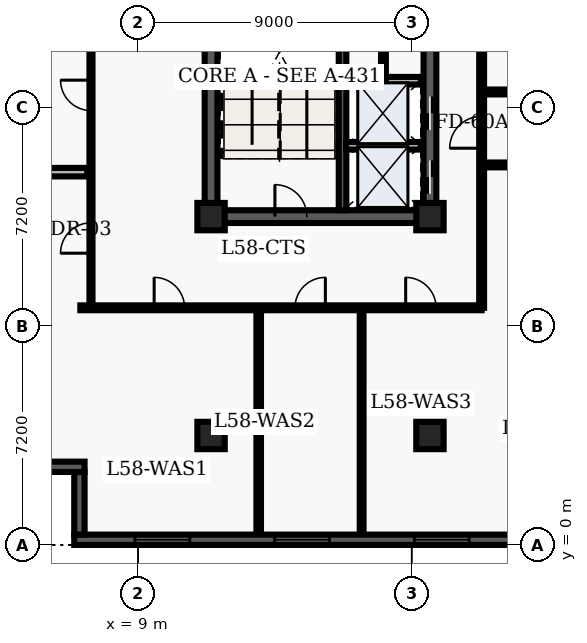
"""IFC4 building model, lengths in metres.
Left out: names, types, materials, properties, quantities, classifications, styles, units other than length and angle.
Written with IfcOpenShell. Run it as: python <this file> out.ifc"""

import sys

from ifc_helpers import new_model, entity, si_unit, converted_unit, direction, frame, origin_with_axes, origin_2d_with_axis, place, context, subcontext, project, spatial, polyline, rectangle, outline, extrude, element, fill, save


model = new_model("IFC4")
c1 = context("Model", 3, precision=1e-05, world=origin_with_axes(), true_north=direction((0.0, 1.0)))
c2 = subcontext(c1, "Body", "Model", "MODEL_VIEW")
j1 = project(units=[si_unit("LENGTHUNIT", "METRE"), converted_unit("PLANEANGLEUNIT", "DEGREE", entity("IfcPlaneAngleMeasure", 0.017), si_unit("PLANEANGLEUNIT", "RADIAN"), dimensions=[0, 0, 0, 0, 0, 0, 0])], contexts=[c1])
p1 = place(None, origin_with_axes())
s1 = spatial("IfcSite", under=j1, at=p1, CompositionType="ELEMENT")
p2 = place(p1, origin_with_axes())
s2 = spatial("IfcBuilding", under=s1, at=p2, CompositionType="ELEMENT")
p3 = place(p2, frame((0.0, 0.0, 236.4), z_axis=(0.0, 0.0, 1.0), x_axis=(1.0, 0.0, 0.0)))
s3 = spatial("IfcBuildingStorey", under=s2, at=p3, CompositionType="ELEMENT", Elevation=236.4)
p4 = place(p3, frame((11.4, 10.8, 0.0), z_axis=(0.0, 0.0, 1.0), x_axis=(0.0, 1.0, 0.0)))
e1 = element("IfcWall", 1, at=p4, inside=s3, PredefinedType="SHEAR", context=c2, shape_type="SweptSolid", body=[
    extrude(outline(polyline([(0.0, -0.21), (27.0, -0.21), (27.0, 0.21), (0.0, 0.21), (0.0, -0.21)])), origin_with_axes(), (0.0, 0.0, 1.0), 3.66),
])
p5 = place(p3, frame((11.4, 10.8, 0.0), z_axis=(0.0, 0.0, 1.0), x_axis=(1.0, 0.0, 0.0)))
e2 = element("IfcWall", 2, at=p5, inside=s3, PredefinedType="SHEAR", context=c2, shape_type="SweptSolid", body=[
    extrude(outline(polyline([(0.0, -0.21), (7.2, -0.21), (7.2, 0.21), (0.0, 0.21), (0.0, -0.21)])), origin_with_axes(), (0.0, 0.0, 1.0), 3.66),
])
p6 = place(p5, frame((2.625, 0.0, 0.0), z_axis=(0.0, 0.0, 1.0), x_axis=(1.0, 0.0, 0.0)))
e3 = element("IfcOpeningElement", 3, at=p6, cuts=e2, PredefinedType="OPENING", context=c2, shape_type="SweptSolid", body=[
    extrude(rectangle(XDim=1.05, YDim=0.44, at=origin_2d_with_axis()), origin_with_axes(), (0.0, 0.0, 1.0), 2.15),
])
p7 = place(p3, frame((18.6, 10.8, 0.0), z_axis=(0.0, 0.0, 1.0), x_axis=(0.0, 1.0, 0.0)))
e4 = element("IfcWall", 4, at=p7, inside=s3, PredefinedType="SHEAR", context=c2, shape_type="SweptSolid", body=[
    extrude(outline(polyline([(0.0, -0.21), (13.5, -0.21), (13.5, 0.21), (0.0, 0.21), (0.0, -0.21)])), origin_with_axes(), (0.0, 0.0, 1.0), 3.66),
])
p8 = place(p7, frame((1.3, 0.0, 0.0), z_axis=(0.0, 0.0, 1.0), x_axis=(1.0, 0.0, 0.0)))
e5 = element("IfcOpeningElement", 5, at=p8, cuts=e4, PredefinedType="OPENING", context=c2, shape_type="SweptSolid", body=[
    extrude(rectangle(XDim=1.1, YDim=0.44, at=origin_2d_with_axis()), origin_with_axes(), (0.0, 0.0, 1.0), 2.15),
])
p9 = place(p7, frame((3.4, 0.0, 0.0), z_axis=(0.0, 0.0, 1.0), x_axis=(1.0, 0.0, 0.0)))
e6 = element("IfcOpeningElement", 6, at=p9, cuts=e4, PredefinedType="OPENING", context=c2, shape_type="SweptSolid", body=[
    extrude(rectangle(XDim=1.1, YDim=0.44, at=origin_2d_with_axis()), origin_with_axes(), (0.0, 0.0, 1.0), 2.15),
])
p10 = place(p7, frame((11.125, 0.0, 0.0), z_axis=(0.0, 0.0, 1.0), x_axis=(1.0, 0.0, 0.0)))
e7 = element("IfcOpeningElement", 7, at=p10, cuts=e4, PredefinedType="OPENING", context=c2, shape_type="SweptSolid", body=[
    extrude(rectangle(XDim=1.05, YDim=0.44, at=origin_2d_with_axis()), origin_with_axes(), (0.0, 0.0, 1.0), 2.15),
])
p11 = place(p7, frame((6.675, 0.0, 0.0), z_axis=(0.0, 0.0, 1.0), x_axis=(1.0, 0.0, 0.0)))
e8 = element("IfcOpeningElement", 8, at=p11, cuts=e4, PredefinedType="OPENING", context=c2, shape_type="SweptSolid", body=[
    extrude(rectangle(XDim=0.95, YDim=0.44, at=origin_2d_with_axis()), origin_with_axes(), (0.0, 0.0, 1.0), 2.15),
])
p12 = place(p3, frame((15.725, 11.01, 0.0), z_axis=(0.0, 0.0, 1.0), x_axis=(0.0, 1.0, 0.0)))
e9 = element("IfcWall", 9, at=p12, inside=s3, PredefinedType="SHEAR", context=c2, shape_type="SweptSolid", body=[
    extrude(outline(polyline([(0.0, -0.125), (8.69, -0.125), (8.69, 0.125), (0.0, 0.125), (0.0, -0.125)])), origin_with_axes(), (0.0, 0.0, 1.0), 3.66),
])
for number, where, z_axis, x_axis in (
    (10, (11.4, 3.6, 0.0), (0.0, 0.0, 1.0), (1.0, 0.0, 0.0)),
    (11, (11.4, 10.8, 0.0), (0.0, 0.0, 1.0), (1.0, 0.0, 0.0)),
    (12, (18.6, 3.6, 0.0), (0.0, 0.0, 1.0), (1.0, 0.0, 0.0)),
    (13, (18.6, 10.8, 0.0), (0.0, 0.0, 1.0), (1.0, 0.0, 0.0)),
):
    element("IfcColumn", number, at=place(p3, frame(where, z_axis=z_axis, x_axis=x_axis)), inside=s3, PredefinedType="COLUMN", context=c2, shape_type="SweptSolid", body=[
        extrude(rectangle(XDim=0.9, YDim=0.9, at=origin_2d_with_axis()), origin_with_axes(), (0.0, 0.0, 1.0), 3.9),
    ])
for number, where, z_axis, x_axis in (
    (14, (15.84, 13.13, 0.0), (0.0, 0.0, 1.0), (1.0, 0.0, 0.0)),
    (15, (15.84, 15.27, 0.0), (0.0, 0.0, 1.0), (1.0, 0.0, 0.0)),
):
    element("IfcWall", number, at=place(p3, frame(where, z_axis=z_axis, x_axis=x_axis)), inside=s3, PredefinedType="SOLIDWALL", context=c2, shape_type="SweptSolid", body=[
        extrude(outline(polyline([(0.0, -0.125), (2.46, -0.125), (2.46, 0.125), (0.0, 0.125), (0.0, -0.125)])), origin_with_axes(), (0.0, 0.0, 1.0), 2.7),
    ])
p13 = place(p3, frame((17.07, 15.34, 0.0), z_axis=(0.0, 0.0, 1.0), x_axis=(0.0, 1.0, 0.0)))
e16 = element("IfcWall", 16, at=p13, inside=s3, PredefinedType="PARTITIONING", context=c2, shape_type="SweptSolid", body=[
    extrude(outline(polyline([(0.0, -0.08), (4.36, -0.08), (4.36, 0.08), (0.0, 0.08), (0.0, -0.08)])), origin_with_axes(), (0.0, 0.0, 1.0), 2.7),
])
p14 = place(p13, frame((2.05, 0.0, 0.0), z_axis=(0.0, 0.0, 1.0), x_axis=(1.0, 0.0, 0.0)))
e17 = element("IfcOpeningElement", 17, at=p14, cuts=e16, PredefinedType="OPENING", context=c2, shape_type="SweptSolid", body=[
    extrude(rectangle(XDim=0.9, YDim=0.18, at=origin_2d_with_axis()), origin_with_axes(), (0.0, 0.0, 1.0), 2.15),
])
p15 = place(p3, frame((7.1, 7.8, 0.0), z_axis=(0.0, 0.0, 1.0), x_axis=(1.0, 0.0, 0.0)))
e18 = element("IfcWall", 18, at=p15, inside=s3, PredefinedType="PARTITIONING", context=c2, shape_type="SweptSolid", body=[
    extrude(outline(polyline([(0.0, -0.08), (13.2, -0.08), (13.2, 0.08), (0.0, 0.08), (0.0, -0.08)])), origin_with_axes(), (0.0, 0.0, 1.0), 2.7),
])
p16 = place(p15, frame((2.929, 0.0, 0.0), z_axis=(0.0, 0.0, 1.0), x_axis=(1.0, 0.0, 0.0)))
e19 = element("IfcOpeningElement", 19, at=p16, cuts=e18, PredefinedType="OPENING", context=c2, shape_type="SweptSolid", body=[
    extrude(rectangle(XDim=1.0, YDim=0.18, at=origin_2d_with_axis()), origin_with_axes(), (0.0, 0.0, 1.0), 2.15),
])
p17 = place(p15, frame((7.56, 0.0, 0.0), z_axis=(0.0, 0.0, 1.0), x_axis=(1.0, 0.0, 0.0)))
e20 = element("IfcOpeningElement", 20, at=p17, cuts=e18, PredefinedType="OPENING", context=c2, shape_type="SweptSolid", body=[
    extrude(rectangle(XDim=1.0, YDim=0.18, at=origin_2d_with_axis()), origin_with_axes(), (0.0, 0.0, 1.0), 2.15),
])
p18 = place(p15, frame((11.201, 0.0, 0.0), z_axis=(0.0, 0.0, 1.0), x_axis=(1.0, 0.0, 0.0)))
e21 = element("IfcOpeningElement", 21, at=p18, cuts=e18, PredefinedType="OPENING", context=c2, shape_type="SweptSolid", body=[
    extrude(rectangle(XDim=1.0, YDim=0.18, at=origin_2d_with_axis()), origin_with_axes(), (0.0, 0.0, 1.0), 2.15),
])
p19 = place(p3, frame((20.3, 7.8, 0.0), z_axis=(0.0, 0.0, 1.0), x_axis=(0.0, 1.0, 0.0)))
e22 = element("IfcWall", 22, at=p19, inside=s3, PredefinedType="PARTITIONING", context=c2, shape_type="SweptSolid", body=[
    extrude(outline(polyline([(0.0, -0.08), (32.7, -0.08), (32.7, 0.08), (0.0, 0.08), (0.0, -0.08)])), origin_with_axes(), (0.0, 0.0, 1.0), 2.7),
])
p20 = place(p19, frame((14.556, 0.0, 0.0), z_axis=(0.0, 0.0, 1.0), x_axis=(1.0, 0.0, 0.0)))
e23 = element("IfcOpeningElement", 23, at=p20, cuts=e22, PredefinedType="OPENING", context=c2, shape_type="SweptSolid", body=[
    extrude(rectangle(XDim=0.9, YDim=0.18, at=origin_2d_with_axis()), origin_with_axes(), (0.0, 0.0, 1.0), 2.15),
])
p21 = place(p19, frame((18.551, 0.0, 0.0), z_axis=(0.0, 0.0, 1.0), x_axis=(1.0, 0.0, 0.0)))
e24 = element("IfcOpeningElement", 24, at=p21, cuts=e22, PredefinedType="OPENING", context=c2, shape_type="SweptSolid", body=[
    extrude(rectangle(XDim=1.0, YDim=0.18, at=origin_2d_with_axis()), origin_with_axes(), (0.0, 0.0, 1.0), 2.15),
])
p22 = place(p19, frame((22.226, 0.0, 0.0), z_axis=(0.0, 0.0, 1.0), x_axis=(1.0, 0.0, 0.0)))
e25 = element("IfcOpeningElement", 25, at=p22, cuts=e22, PredefinedType="OPENING", context=c2, shape_type="SweptSolid", body=[
    extrude(rectangle(XDim=1.0, YDim=0.18, at=origin_2d_with_axis()), origin_with_axes(), (0.0, 0.0, 1.0), 2.15),
])
p23 = place(p19, frame((25.754, 0.0, 0.0), z_axis=(0.0, 0.0, 1.0), x_axis=(1.0, 0.0, 0.0)))
e26 = element("IfcOpeningElement", 26, at=p23, cuts=e22, PredefinedType="OPENING", context=c2, shape_type="SweptSolid", body=[
    extrude(rectangle(XDim=1.0, YDim=0.18, at=origin_2d_with_axis()), origin_with_axes(), (0.0, 0.0, 1.0), 2.15),
])
p24 = place(p19, frame((5.775, 0.0, 0.0), z_axis=(0.0, 0.0, 1.0), x_axis=(1.0, 0.0, 0.0)))
e27 = element("IfcOpeningElement", 27, at=p24, cuts=e22, PredefinedType="OPENING", context=c2, shape_type="SweptSolid", body=[
    extrude(rectangle(XDim=1.05, YDim=0.18, at=origin_2d_with_axis()), origin_with_axes(), (0.0, 0.0, 1.0), 2.15),
])
p25 = place(p3, frame((7.45, 7.8, 0.0), z_axis=(0.0, 0.0, 1.0), x_axis=(0.0, 1.0, 0.0)))
e28 = element("IfcWall", 28, at=p25, inside=s3, PredefinedType="PARTITIONING", context=c2, shape_type="SweptSolid", body=[
    extrude(outline(polyline([(0.0, -0.05), (32.7, -0.05), (32.7, 0.05), (0.0, 0.05), (0.0, -0.05)])), origin_with_axes(), (0.0, 0.0, 1.0), 2.7),
])
p26 = place(p25, frame((2.296, 0.0, 0.0), z_axis=(0.0, 0.0, 1.0), x_axis=(1.0, 0.0, 0.0)))
e29 = element("IfcOpeningElement", 29, at=p26, cuts=e28, PredefinedType="OPENING", context=c2, shape_type="SweptSolid", body=[
    extrude(rectangle(XDim=1.0, YDim=0.12, at=origin_2d_with_axis()), origin_with_axes(), (0.0, 0.0, 1.0), 2.15),
])
p27 = place(p25, frame((6.989, 0.0, 0.0), z_axis=(0.0, 0.0, 1.0), x_axis=(1.0, 0.0, 0.0)))
e30 = element("IfcOpeningElement", 30, at=p27, cuts=e28, PredefinedType="OPENING", context=c2, shape_type="SweptSolid", body=[
    extrude(rectangle(XDim=1.0, YDim=0.12, at=origin_2d_with_axis()), origin_with_axes(), (0.0, 0.0, 1.0), 2.15),
])
p28 = place(p25, frame((12.56, 0.0, 0.0), z_axis=(0.0, 0.0, 1.0), x_axis=(1.0, 0.0, 0.0)))
e31 = element("IfcOpeningElement", 31, at=p28, cuts=e28, PredefinedType="OPENING", context=c2, shape_type="SweptSolid", body=[
    extrude(rectangle(XDim=1.0, YDim=0.12, at=origin_2d_with_axis()), origin_with_axes(), (0.0, 0.0, 1.0), 2.15),
])
p29 = place(p25, frame((19.334, 0.0, 0.0), z_axis=(0.0, 0.0, 1.0), x_axis=(1.0, 0.0, 0.0)))
e32 = element("IfcOpeningElement", 32, at=p29, cuts=e28, PredefinedType="OPENING", context=c2, shape_type="SweptSolid", body=[
    extrude(rectangle(XDim=1.0, YDim=0.12, at=origin_2d_with_axis()), origin_with_axes(), (0.0, 0.0, 1.0), 2.15),
])
p30 = place(p25, frame((27.817, 0.0, 0.0), z_axis=(0.0, 0.0, 1.0), x_axis=(1.0, 0.0, 0.0)))
e33 = element("IfcOpeningElement", 33, at=p30, cuts=e28, PredefinedType="OPENING", context=c2, shape_type="SweptSolid", body=[
    extrude(rectangle(XDim=1.0, YDim=0.12, at=origin_2d_with_axis()), origin_with_axes(), (0.0, 0.0, 1.0), 2.15),
])
p31 = place(p3, frame((4.835, 12.262, 0.0), z_axis=(0.0, 0.0, 1.0), x_axis=(1.0, 0.0, 0.0)))
e34 = element("IfcWall", 34, at=p31, inside=s3, PredefinedType="PARTITIONING", context=c2, shape_type="SweptSolid", body=[
    extrude(outline(polyline([(0.0, -0.14), (2.495, -0.14), (2.495, 0.14), (0.0, 0.14), (0.0, -0.14)])), origin_with_axes(), (0.0, 0.0, 1.0), 2.7),
])
p32 = place(p3, frame((12.967, 0.335, 0.0), z_axis=(0.0, 0.0, 1.0), x_axis=(0.0, 1.0, 0.0)))
e35 = element("IfcWall", 35, at=p32, inside=s3, PredefinedType="PARTITIONING", context=c2, shape_type="SweptSolid", body=[
    extrude(outline(polyline([(0.0, -0.075), (7.365, -0.075), (7.365, 0.075), (0.0, 0.075), (0.0, -0.075)])), origin_with_axes(), (0.0, 0.0, 1.0), 2.7),
])
p33 = place(p3, frame((16.353, 0.335, 0.0), z_axis=(0.0, 0.0, 1.0), x_axis=(0.0, 1.0, 0.0)))
e36 = element("IfcWall", 36, at=p33, inside=s3, PredefinedType="PARTITIONING", context=c2, shape_type="SweptSolid", body=[
    extrude(outline(polyline([(0.0, -0.062), (7.365, -0.062), (7.365, 0.062), (0.0, 0.062), (0.0, -0.062)])), origin_with_axes(), (0.0, 0.0, 1.0), 2.7),
])
p34 = place(p3, frame((20.3, 12.5, 0.0), z_axis=(0.0, 0.0, 1.0), x_axis=(1.0, 0.0, 0.0)))
e37 = element("IfcWall", 37, at=p34, inside=s3, PredefinedType="PARTITIONING", context=c2, shape_type="SweptSolid", body=[
    extrude(outline(polyline([(0.0, -0.08), (16.05, -0.08), (16.05, 0.08), (0.0, 0.08), (0.0, -0.08)])), origin_with_axes(), (0.0, 0.0, 1.0), 2.7),
])
p35 = place(p34, frame((3.865, 0.0, 0.0), z_axis=(0.0, 0.0, 1.0), x_axis=(1.0, 0.0, 0.0)))
e38 = element("IfcOpeningElement", 38, at=p35, cuts=e37, PredefinedType="OPENING", context=c2, shape_type="SweptSolid", body=[
    extrude(rectangle(XDim=1.2, YDim=0.18, at=origin_2d_with_axis()), origin_with_axes(), (0.0, 0.0, 1.0), 2.2),
])
p36 = place(p34, frame((9.48, 0.0, 0.0), z_axis=(0.0, 0.0, 1.0), x_axis=(1.0, 0.0, 0.0)))
e39 = element("IfcOpeningElement", 39, at=p36, cuts=e37, PredefinedType="OPENING", context=c2, shape_type="SweptSolid", body=[
    extrude(rectangle(XDim=1.0, YDim=0.18, at=origin_2d_with_axis()), origin_with_axes(), (0.0, 0.0, 1.0), 2.15),
])
p37 = place(p34, frame((13.691, 0.0, 0.0), z_axis=(0.0, 0.0, 1.0), x_axis=(1.0, 0.0, 0.0)))
e40 = element("IfcOpeningElement", 40, at=p37, cuts=e37, PredefinedType="OPENING", context=c2, shape_type="SweptSolid", body=[
    extrude(rectangle(XDim=1.0, YDim=0.18, at=origin_2d_with_axis()), origin_with_axes(), (0.0, 0.0, 1.0), 2.15),
])
p38 = place(p3, frame((20.3, 14.9, 0.0), z_axis=(0.0, 0.0, 1.0), x_axis=(1.0, 0.0, 0.0)))
e41 = element("IfcWall", 41, at=p38, inside=s3, PredefinedType="PARTITIONING", context=c2, shape_type="SweptSolid", body=[
    extrude(outline(polyline([(0.0, -0.08), (16.05, -0.08), (16.05, 0.08), (0.0, 0.08), (0.0, -0.08)])), origin_with_axes(), (0.0, 0.0, 1.0), 2.7),
])
p39 = place(p38, frame((8.075, 0.0, 0.0), z_axis=(0.0, 0.0, 1.0), x_axis=(1.0, 0.0, 0.0)))
e42 = element("IfcOpeningElement", 42, at=p39, cuts=e41, PredefinedType="OPENING", context=c2, shape_type="SweptSolid", body=[
    extrude(rectangle(XDim=1.2, YDim=0.18, at=origin_2d_with_axis()), origin_with_axes(), (0.0, 0.0, 1.0), 2.2),
])
p40 = place(p3, frame((49.46, 0.17, 0.0), z_axis=(0.0, 0.0, 1.0), x_axis=(-1.0, 0.0, 0.0)))
e43 = element("IfcWall", 43, at=p40, inside=s3, PredefinedType="SOLIDWALL", context=c2, shape_type="SweptSolid", body=[
    extrude(outline(polyline([(0.0, -0.17), (42.56, -0.17), (42.56, 0.17), (0.0, 0.17), (0.0, -0.17)])), origin_with_axes(), (0.0, 0.0, 1.0), 3.66),
])
p41 = place(p40, frame((2.898, 0.0, 0.45), z_axis=(0.0, 0.0, 1.0), x_axis=(1.0, 0.0, 0.0)))
e44 = element("IfcOpeningElement", 44, at=p41, cuts=e43, PredefinedType="OPENING", context=c2, shape_type="SweptSolid", body=[
    extrude(rectangle(XDim=1.8, YDim=0.36, at=origin_2d_with_axis()), origin_with_axes(), (0.0, 0.0, 1.0), 2.1),
])
p42 = place(p40, frame((7.493, 0.0, 0.45), z_axis=(0.0, 0.0, 1.0), x_axis=(1.0, 0.0, 0.0)))
e45 = element("IfcOpeningElement", 45, at=p42, cuts=e43, PredefinedType="OPENING", context=c2, shape_type="SweptSolid", body=[
    extrude(rectangle(XDim=1.8, YDim=0.36, at=origin_2d_with_axis()), origin_with_axes(), (0.0, 0.0, 1.0), 2.1),
])
p43 = place(p40, frame((12.089, 0.0, 0.45), z_axis=(0.0, 0.0, 1.0), x_axis=(1.0, 0.0, 0.0)))
e46 = element("IfcOpeningElement", 46, at=p43, cuts=e43, PredefinedType="OPENING", context=c2, shape_type="SweptSolid", body=[
    extrude(rectangle(XDim=1.8, YDim=0.36, at=origin_2d_with_axis()), origin_with_axes(), (0.0, 0.0, 1.0), 2.1),
])
p44 = place(p40, frame((16.234, 0.0, 0.45), z_axis=(0.0, 0.0, 1.0), x_axis=(1.0, 0.0, 0.0)))
e47 = element("IfcOpeningElement", 47, at=p44, cuts=e43, PredefinedType="OPENING", context=c2, shape_type="SweptSolid", body=[
    extrude(rectangle(XDim=1.8, YDim=0.36, at=origin_2d_with_axis()), origin_with_axes(), (0.0, 0.0, 1.0), 2.1),
])
p45 = place(p40, frame((25.876, 0.0, 0.45), z_axis=(0.0, 0.0, 1.0), x_axis=(1.0, 0.0, 0.0)))
e48 = element("IfcOpeningElement", 48, at=p45, cuts=e43, PredefinedType="OPENING", context=c2, shape_type="SweptSolid", body=[
    extrude(rectangle(XDim=1.8, YDim=0.36, at=origin_2d_with_axis()), origin_with_axes(), (0.0, 0.0, 1.0), 2.1),
])
p46 = place(p40, frame((30.471, 0.0, 0.45), z_axis=(0.0, 0.0, 1.0), x_axis=(1.0, 0.0, 0.0)))
e49 = element("IfcOpeningElement", 49, at=p46, cuts=e43, PredefinedType="OPENING", context=c2, shape_type="SweptSolid", body=[
    extrude(rectangle(XDim=1.8, YDim=0.36, at=origin_2d_with_axis()), origin_with_axes(), (0.0, 0.0, 1.0), 2.1),
])
p47 = place(p40, frame((35.067, 0.0, 0.45), z_axis=(0.0, 0.0, 1.0), x_axis=(1.0, 0.0, 0.0)))
e50 = element("IfcOpeningElement", 50, at=p47, cuts=e43, PredefinedType="OPENING", context=c2, shape_type="SweptSolid", body=[
    extrude(rectangle(XDim=1.8, YDim=0.36, at=origin_2d_with_axis()), origin_with_axes(), (0.0, 0.0, 1.0), 2.1),
])
p48 = place(p40, frame((39.662, 0.0, 0.45), z_axis=(0.0, 0.0, 1.0), x_axis=(1.0, 0.0, 0.0)))
e51 = element("IfcOpeningElement", 51, at=p48, cuts=e43, PredefinedType="OPENING", context=c2, shape_type="SweptSolid", body=[
    extrude(rectangle(XDim=1.8, YDim=0.36, at=origin_2d_with_axis()), origin_with_axes(), (0.0, 0.0, 1.0), 2.1),
])
p49 = place(p3, frame((7.07, 0.34, 0.0), z_axis=(0.0, 0.0, 1.0), x_axis=(0.0, 1.0, 0.0)))
e52 = element("IfcWall", 52, at=p49, inside=s3, PredefinedType="SOLIDWALL", context=c2, shape_type="SweptSolid", body=[
    extrude(outline(polyline([(0.0, -0.17), (2.06, -0.17), (2.06, 0.17), (0.0, 0.17), (0.0, -0.17)])), origin_with_axes(), (0.0, 0.0, 1.0), 3.66),
])
p50 = place(p3, frame((7.24, 2.57, 0.0), z_axis=(0.0, 0.0, 1.0), x_axis=(-1.0, 0.0, 0.0)))
e53 = element("IfcWall", 53, at=p50, inside=s3, PredefinedType="SOLIDWALL", context=c2, shape_type="SweptSolid", body=[
    extrude(outline(polyline([(0.0, -0.17), (2.74, -0.17), (2.74, 0.17), (0.0, 0.17), (0.0, -0.17)])), origin_with_axes(), (0.0, 0.0, 1.0), 3.66),
])
p51 = place(p7, frame((1.3, 0.0, 0.0), z_axis=(0.0, 0.0, 1.0), x_axis=(1.0, 0.0, 0.0)))
e54 = element("IfcDoor", 54, at=p51, inside=s3, OperationType="SLIDING_TO_LEFT", PredefinedType="DOOR", context=c2, shape_type="SweptSolid", body=[
    extrude(rectangle(XDim=1.1, YDim=0.09, at=origin_2d_with_axis()), origin_with_axes(), (0.0, 0.0, 1.0), 2.15),
])
fill(e5, e54)
p52 = place(p7, frame((3.4, 0.0, 0.0), z_axis=(0.0, 0.0, 1.0), x_axis=(1.0, 0.0, 0.0)))
e55 = element("IfcDoor", 55, at=p52, inside=s3, OperationType="SLIDING_TO_RIGHT", PredefinedType="DOOR", context=c2, shape_type="SweptSolid", body=[
    extrude(rectangle(XDim=1.1, YDim=0.09, at=origin_2d_with_axis()), origin_with_axes(), (0.0, 0.0, 1.0), 2.15),
])
fill(e6, e55)
p53 = place(p5, frame((2.625, 0.0, 0.0), z_axis=(0.0, 0.0, 1.0), x_axis=(1.0, 0.0, 0.0)))
e56 = element("IfcDoor", 56, at=p53, inside=s3, OperationType="SINGLE_SWING_LEFT", PredefinedType="DOOR", context=c2, shape_type="SweptSolid", body=[
    extrude(rectangle(XDim=1.05, YDim=0.09, at=origin_2d_with_axis()), origin_with_axes(), (0.0, 0.0, 1.0), 2.15),
])
fill(e3, e56)
p54 = place(p25, frame((2.296, 0.0, 0.0), z_axis=(0.0, 0.0, 1.0), x_axis=(1.0, 0.0, 0.0)))
e57 = element("IfcDoor", 57, at=p54, inside=s3, OperationType="SINGLE_SWING_LEFT", PredefinedType="DOOR", context=c2, shape_type="SweptSolid", body=[
    extrude(rectangle(XDim=1.0, YDim=0.06, at=origin_2d_with_axis()), origin_with_axes(), (0.0, 0.0, 1.0), 2.15),
])
fill(e29, e57)
p55 = place(p25, frame((6.989, 0.0, 0.0), z_axis=(0.0, 0.0, 1.0), x_axis=(1.0, 0.0, 0.0)))
e58 = element("IfcDoor", 58, at=p55, inside=s3, OperationType="SINGLE_SWING_RIGHT", PredefinedType="DOOR", context=c2, shape_type="SweptSolid", body=[
    extrude(rectangle(XDim=1.0, YDim=0.06, at=origin_2d_with_axis()), origin_with_axes(), (0.0, 0.0, 1.0), 2.15),
])
fill(e30, e58)
p56 = place(p15, frame((2.929, 0.0, 0.0), z_axis=(0.0, 0.0, 1.0), x_axis=(1.0, 0.0, 0.0)))
e59 = element("IfcDoor", 59, at=p56, inside=s3, OperationType="SINGLE_SWING_LEFT", PredefinedType="DOOR", context=c2, shape_type="SweptSolid", body=[
    extrude(rectangle(XDim=1.0, YDim=0.09, at=origin_2d_with_axis()), origin_with_axes(), (0.0, 0.0, 1.0), 2.15),
])
fill(e19, e59)
p57 = place(p15, frame((7.56, 0.0, 0.0), z_axis=(0.0, 0.0, 1.0), x_axis=(1.0, 0.0, 0.0)))
e60 = element("IfcDoor", 60, at=p57, inside=s3, OperationType="SINGLE_SWING_RIGHT", PredefinedType="DOOR", context=c2, shape_type="SweptSolid", body=[
    extrude(rectangle(XDim=1.0, YDim=0.09, at=origin_2d_with_axis()), origin_with_axes(), (0.0, 0.0, 1.0), 2.15),
])
fill(e20, e60)
p58 = place(p15, frame((11.201, 0.0, 0.0), z_axis=(0.0, 0.0, 1.0), x_axis=(1.0, 0.0, 0.0)))
e61 = element("IfcDoor", 61, at=p58, inside=s3, OperationType="SINGLE_SWING_LEFT", PredefinedType="DOOR", context=c2, shape_type="SweptSolid", body=[
    extrude(rectangle(XDim=1.0, YDim=0.09, at=origin_2d_with_axis()), origin_with_axes(), (0.0, 0.0, 1.0), 2.15),
])
fill(e21, e61)
p59 = place(p19, frame((5.775, 0.0, 0.0), z_axis=(0.0, 0.0, 1.0), x_axis=(1.0, 0.0, 0.0)))
e62 = element("IfcDoor", 62, at=p59, inside=s3, OperationType="SINGLE_SWING_LEFT", PredefinedType="DOOR", context=c2, shape_type="SweptSolid", body=[
    extrude(rectangle(XDim=1.05, YDim=0.09, at=origin_2d_with_axis()), origin_with_axes(), (0.0, 0.0, 1.0), 2.15),
])
fill(e27, e62)
p60 = place(p40, frame((30.471, 0.0, 0.45), z_axis=(0.0, 0.0, 1.0), x_axis=(1.0, 0.0, 0.0)))
e63 = element("IfcWindow", 63, at=p60, inside=s3, PredefinedType="WINDOW", context=c2, shape_type="SweptSolid", body=[
    extrude(rectangle(XDim=1.8, YDim=0.09, at=origin_2d_with_axis()), origin_with_axes(), (0.0, 0.0, 1.0), 2.1),
])
fill(e49, e63)
p61 = place(p40, frame((35.067, 0.0, 0.45), z_axis=(0.0, 0.0, 1.0), x_axis=(1.0, 0.0, 0.0)))
e64 = element("IfcWindow", 64, at=p61, inside=s3, PredefinedType="WINDOW", context=c2, shape_type="SweptSolid", body=[
    extrude(rectangle(XDim=1.8, YDim=0.09, at=origin_2d_with_axis()), origin_with_axes(), (0.0, 0.0, 1.0), 2.1),
])
fill(e50, e64)
p62 = place(p40, frame((39.662, 0.0, 0.45), z_axis=(0.0, 0.0, 1.0), x_axis=(1.0, 0.0, 0.0)))
e65 = element("IfcWindow", 65, at=p62, inside=s3, PredefinedType="WINDOW", context=c2, shape_type="SweptSolid", body=[
    extrude(rectangle(XDim=1.8, YDim=0.09, at=origin_2d_with_axis()), origin_with_axes(), (0.0, 0.0, 1.0), 2.1),
])
fill(e51, e65)
save(model, sys.argv[1])
